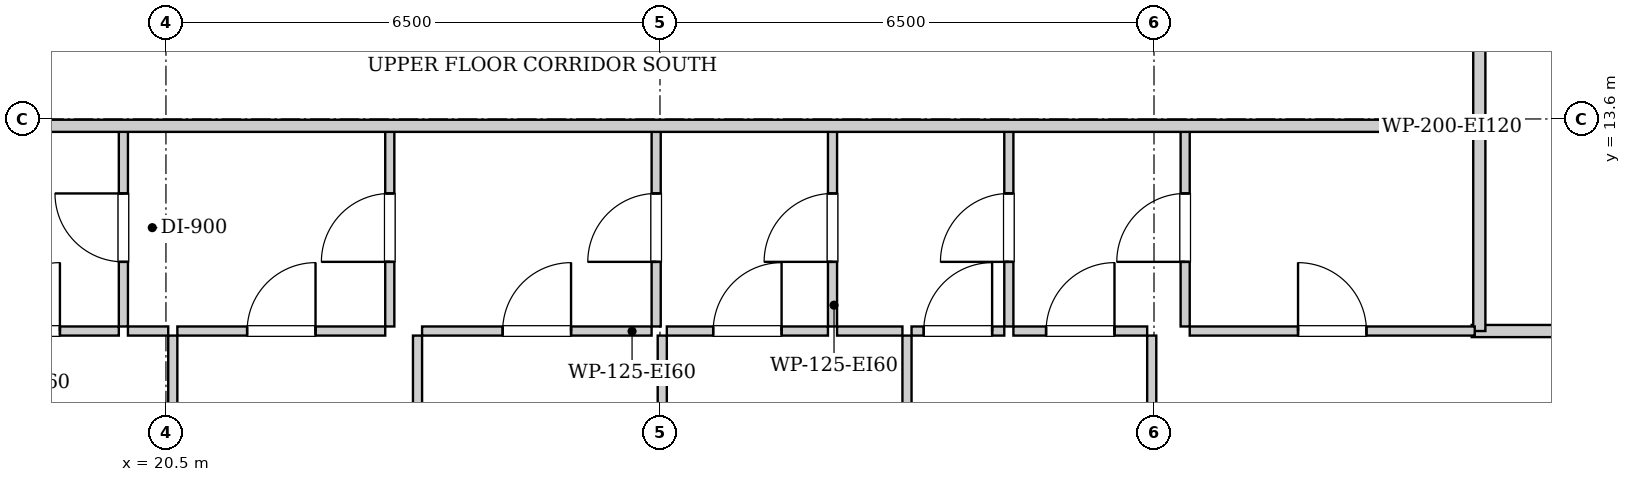
"""IFC4 building model, lengths in metres.
Left out: names, types, materials, properties, quantities, classifications, styles, units other than length and angle.
Written with IfcOpenShell. Run it as: python <this file> out.ifc"""

import sys

from ifc_helpers import new_model, si_unit, direction, frame, frame_2d, origin, place, context, subcontext, project, spatial, rectangle, extrude, element, fill, save


model = new_model("IFC4")
c1 = context("Model", 3, precision=1e-05, world=origin(), true_north=direction((0.0, 1.0)))
c2 = subcontext(c1, "Body", "Model", "MODEL_VIEW")
j1 = project(units=[si_unit("LENGTHUNIT", "METRE"), si_unit("PLANEANGLEUNIT", "RADIAN")], contexts=[c1])
p1 = place(None, origin())
s1 = spatial("IfcSite", under=j1, at=p1, CompositionType="ELEMENT")
p2 = place(p1, origin())
s2 = spatial("IfcBuilding", under=s1, at=p2, CompositionType="ELEMENT")
p3 = place(p2, frame((0.0, 0.0, 181.0)))
s3 = spatial("IfcBuildingStorey", under=s2, at=p3, CompositionType="ELEMENT", Elevation=181.0)
p4 = place(p3, frame((37.78, 13.51, 0.0), z_axis=(0.0, 0.0, 1.0), x_axis=(0.0, 1.0, 0.0)))
e1 = element("IfcWall", 1, at=p4, inside=s3, PredefinedType="PARTITIONING", context=c2, shape_type="SweptSolid", body=[
    extrude(rectangle(XDim=1.58, YDim=0.16, at=frame_2d((0.79, 0.0))), origin(), (0.0, 0.0, 1.0), 3.04),
])
p5 = place(p3, frame((37.68, 10.81, 0.0), z_axis=(0.0, 0.0, 1.0), x_axis=(1.0, 0.0, 0.0)))
e2 = element("IfcWall", 2, at=p5, inside=s3, PredefinedType="PARTITIONING", context=c2, shape_type="SweptSolid", body=[
    extrude(rectangle(XDim=2.34, YDim=0.16, at=frame_2d((1.17, 0.0))), origin(), (0.0, 0.0, 1.0), 3.04),
])
p6 = place(p3, frame((37.78, 10.81, 0.0), z_axis=(0.0, 0.0, 1.0), x_axis=(0.0, 1.0, 0.0)))
e3 = element("IfcWall", 3, at=p6, inside=s3, PredefinedType="PARTITIONING", context=c2, shape_type="SweptSolid", body=[
    extrude(rectangle(XDim=2.66, YDim=0.16, at=frame_2d((1.33, 0.0))), origin(), (0.0, 0.0, 1.0), 3.04),
])
p7 = place(p3, frame((19.94, 10.87, 0.0), z_axis=(0.0, 0.0, 1.0), x_axis=(0.0, 1.0, 0.0)))
e4 = element("IfcWall", 4, at=p7, inside=s3, PredefinedType="PARTITIONING", context=c2, shape_type="SweptSolid", body=[
    extrude(rectangle(XDim=2.6, YDim=0.12, at=frame_2d((1.3, 0.0))), origin(), (0.0, 0.0, 1.0), 3.04),
])
p8 = place(p7, frame((0.85, 0.0, 0.0)))
e5 = element("IfcOpeningElement", 5, at=p8, cuts=e4, PredefinedType="OPENING", context=c2, shape_type="SweptSolid", body=[
    extrude(rectangle(XDim=0.9, YDim=2.05, at=frame_2d((0.45, 1.025))), frame((0.0, 0.07, 0.0), z_axis=(0.0, -1.0, 0.0), x_axis=(1.0, 0.0, 0.0)), (0.0, 0.0, 1.0), 0.14),
])
p9 = place(p3, frame((17.43, 10.81, 0.0), z_axis=(0.0, 0.0, 1.0), x_axis=(1.0, 0.0, 0.0)))
e6 = element("IfcWall", 6, at=p9, inside=s3, PredefinedType="PARTITIONING", context=c2, shape_type="SweptSolid", body=[
    extrude(rectangle(XDim=2.45, YDim=0.12, at=frame_2d((1.225, 0.0))), origin(), (0.0, 0.0, 1.0), 3.04),
])
p10 = place(p9, frame((0.775, 0.0, 0.0)))
e7 = element("IfcOpeningElement", 7, at=p10, cuts=e6, PredefinedType="OPENING", context=c2, shape_type="SweptSolid", body=[
    extrude(rectangle(XDim=0.9, YDim=2.05, at=frame_2d((0.45, 1.025))), frame((0.0, 0.07, 0.0), z_axis=(0.0, -1.0, 0.0), x_axis=(1.0, 0.0, 0.0)), (0.0, 0.0, 1.0), 0.14),
])
p11 = place(p3, frame((23.445, 10.87, 0.0), z_axis=(0.0, 0.0, 1.0), x_axis=(0.0, 1.0, 0.0)))
e8 = element("IfcWall", 8, at=p11, inside=s3, PredefinedType="PARTITIONING", context=c2, shape_type="SweptSolid", body=[
    extrude(rectangle(XDim=2.6, YDim=0.12, at=frame_2d((1.3, 0.0))), origin(), (0.0, 0.0, 1.0), 3.04),
])
p12 = place(p11, frame((0.85, 0.0, 0.0)))
e9 = element("IfcOpeningElement", 9, at=p12, cuts=e8, PredefinedType="OPENING", context=c2, shape_type="SweptSolid", body=[
    extrude(rectangle(XDim=0.9, YDim=2.05, at=frame_2d((0.45, 1.025))), frame((0.0, 0.07, 0.0), z_axis=(0.0, -1.0, 0.0), x_axis=(1.0, 0.0, 0.0)), (0.0, 0.0, 1.0), 0.14),
])
p13 = place(p3, frame((20.0, 10.81, 0.0), z_axis=(0.0, 0.0, 1.0), x_axis=(1.0, 0.0, 0.0)))
e10 = element("IfcWall", 10, at=p13, inside=s3, PredefinedType="PARTITIONING", context=c2, shape_type="SweptSolid", body=[
    extrude(rectangle(XDim=0.53, YDim=0.12, at=frame_2d((0.265, 0.0))), origin(), (0.0, 0.0, 1.0), 3.04),
])
p14 = place(p3, frame((20.65, 10.81, 0.0), z_axis=(0.0, 0.0, 1.0), x_axis=(1.0, 0.0, 0.0)))
e11 = element("IfcWall", 11, at=p14, inside=s3, PredefinedType="PARTITIONING", context=c2, shape_type="SweptSolid", body=[
    extrude(rectangle(XDim=2.735, YDim=0.12, at=frame_2d((1.368, 0.0))), origin(), (0.0, 0.0, 1.0), 3.04),
])
p15 = place(p14, frame((0.918, 0.0, 0.0)))
e12 = element("IfcOpeningElement", 12, at=p15, cuts=e11, PredefinedType="OPENING", context=c2, shape_type="SweptSolid", body=[
    extrude(rectangle(XDim=0.9, YDim=2.05, at=frame_2d((0.45, 1.025))), frame((0.0, 0.07, 0.0), z_axis=(0.0, -1.0, 0.0), x_axis=(1.0, 0.0, 0.0)), (0.0, 0.0, 1.0), 0.14),
])
p16 = place(p3, frame((26.95, 10.87, 0.0), z_axis=(0.0, 0.0, 1.0), x_axis=(0.0, 1.0, 0.0)))
e13 = element("IfcWall", 13, at=p16, inside=s3, PredefinedType="PARTITIONING", context=c2, shape_type="SweptSolid", body=[
    extrude(rectangle(XDim=2.6, YDim=0.12, at=frame_2d((1.3, 0.0))), origin(), (0.0, 0.0, 1.0), 3.04),
])
p17 = place(p16, frame((0.85, 0.0, 0.0)))
e14 = element("IfcOpeningElement", 14, at=p17, cuts=e13, PredefinedType="OPENING", context=c2, shape_type="SweptSolid", body=[
    extrude(rectangle(XDim=0.9, YDim=2.05, at=frame_2d((0.45, 1.025))), frame((0.0, 0.07, 0.0), z_axis=(0.0, -1.0, 0.0), x_axis=(1.0, 0.0, 0.0)), (0.0, 0.0, 1.0), 0.14),
])
p18 = place(p3, frame((23.87, 10.81, 0.0), z_axis=(0.0, 0.0, 1.0), x_axis=(1.0, 0.0, 0.0)))
e15 = element("IfcWall", 15, at=p18, inside=s3, PredefinedType="PARTITIONING", context=c2, shape_type="SweptSolid", body=[
    extrude(rectangle(XDim=3.02, YDim=0.12, at=frame_2d((1.51, 0.0))), origin(), (0.0, 0.0, 1.0), 3.04),
])
p19 = place(p18, frame((1.06, 0.0, 0.0)))
e16 = element("IfcOpeningElement", 16, at=p19, cuts=e15, PredefinedType="OPENING", context=c2, shape_type="SweptSolid", body=[
    extrude(rectangle(XDim=0.9, YDim=2.05, at=frame_2d((0.45, 1.025))), frame((0.0, 0.07, 0.0), z_axis=(0.0, -1.0, 0.0), x_axis=(1.0, 0.0, 0.0)), (0.0, 0.0, 1.0), 0.14),
])
p20 = place(p3, frame((29.27, 10.87, 0.0), z_axis=(0.0, 0.0, 1.0), x_axis=(0.0, 1.0, 0.0)))
e17 = element("IfcWall", 17, at=p20, inside=s3, PredefinedType="PARTITIONING", context=c2, shape_type="SweptSolid", body=[
    extrude(rectangle(XDim=2.6, YDim=0.12, at=frame_2d((1.3, 0.0))), origin(), (0.0, 0.0, 1.0), 3.04),
])
p21 = place(p20, frame((0.85, 0.0, 0.0)))
e18 = element("IfcOpeningElement", 18, at=p21, cuts=e17, PredefinedType="OPENING", context=c2, shape_type="SweptSolid", body=[
    extrude(rectangle(XDim=0.9, YDim=2.05, at=frame_2d((0.45, 1.025))), frame((0.0, 0.07, 0.0), z_axis=(0.0, -1.0, 0.0), x_axis=(1.0, 0.0, 0.0)), (0.0, 0.0, 1.0), 0.14),
])
p22 = place(p3, frame((27.09, 10.81, 0.0), z_axis=(0.0, 0.0, 1.0), x_axis=(1.0, 0.0, 0.0)))
e19 = element("IfcWall", 19, at=p22, inside=s3, PredefinedType="PARTITIONING", context=c2, shape_type="SweptSolid", body=[
    extrude(rectangle(XDim=2.12, YDim=0.12, at=frame_2d((1.06, 0.0))), origin(), (0.0, 0.0, 1.0), 3.04),
])
p23 = place(p22, frame((0.61, 0.0, 0.0)))
e20 = element("IfcOpeningElement", 20, at=p23, cuts=e19, PredefinedType="OPENING", context=c2, shape_type="SweptSolid", body=[
    extrude(rectangle(XDim=0.9, YDim=2.05, at=frame_2d((0.45, 1.025))), frame((0.0, 0.07, 0.0), z_axis=(0.0, -1.0, 0.0), x_axis=(1.0, 0.0, 0.0)), (0.0, 0.0, 1.0), 0.14),
])
p24 = place(p3, frame((31.59, 10.87, 0.0), z_axis=(0.0, 0.0, 1.0), x_axis=(0.0, 1.0, 0.0)))
e21 = element("IfcWall", 21, at=p24, inside=s3, PredefinedType="PARTITIONING", context=c2, shape_type="SweptSolid", body=[
    extrude(rectangle(XDim=2.6, YDim=0.12, at=frame_2d((1.3, 0.0))), origin(), (0.0, 0.0, 1.0), 3.04),
])
p25 = place(p24, frame((0.85, 0.0, 0.0)))
e22 = element("IfcOpeningElement", 22, at=p25, cuts=e21, PredefinedType="OPENING", context=c2, shape_type="SweptSolid", body=[
    extrude(rectangle(XDim=0.9, YDim=2.05, at=frame_2d((0.45, 1.025))), frame((0.0, 0.07, 0.0), z_axis=(0.0, -1.0, 0.0), x_axis=(1.0, 0.0, 0.0)), (0.0, 0.0, 1.0), 0.14),
])
p26 = place(p3, frame((29.33, 10.81, 0.0), z_axis=(0.0, 0.0, 1.0), x_axis=(1.0, 0.0, 0.0)))
e23 = element("IfcWall", 23, at=p26, inside=s3, PredefinedType="PARTITIONING", context=c2, shape_type="SweptSolid", body=[
    extrude(rectangle(XDim=0.86, YDim=0.12, at=frame_2d((0.43, 0.0))), origin(), (0.0, 0.0, 1.0), 3.04),
])
p27 = place(p3, frame((30.31, 10.81, 0.0), z_axis=(0.0, 0.0, 1.0), x_axis=(1.0, 0.0, 0.0)))
e24 = element("IfcWall", 24, at=p27, inside=s3, PredefinedType="PARTITIONING", context=c2, shape_type="SweptSolid", body=[
    extrude(rectangle(XDim=1.22, YDim=0.12, at=frame_2d((0.61, 0.0))), origin(), (0.0, 0.0, 1.0), 3.04),
])
p28 = place(p27, frame((0.16, 0.0, 0.0)))
e25 = element("IfcOpeningElement", 25, at=p28, cuts=e24, PredefinedType="OPENING", context=c2, shape_type="SweptSolid", body=[
    extrude(rectangle(XDim=0.9, YDim=2.05, at=frame_2d((0.45, 1.025))), frame((0.0, 0.07, 0.0), z_axis=(0.0, -1.0, 0.0), x_axis=(1.0, 0.0, 0.0)), (0.0, 0.0, 1.0), 0.14),
])
p29 = place(p3, frame((33.91, 10.87, 0.0), z_axis=(0.0, 0.0, 1.0), x_axis=(0.0, 1.0, 0.0)))
e26 = element("IfcWall", 26, at=p29, inside=s3, PredefinedType="PARTITIONING", context=c2, shape_type="SweptSolid", body=[
    extrude(rectangle(XDim=2.6, YDim=0.12, at=frame_2d((1.3, 0.0))), origin(), (0.0, 0.0, 1.0), 3.04),
])
p30 = place(p29, frame((0.85, 0.0, 0.0)))
e27 = element("IfcOpeningElement", 27, at=p30, cuts=e26, PredefinedType="OPENING", context=c2, shape_type="SweptSolid", body=[
    extrude(rectangle(XDim=0.9, YDim=2.05, at=frame_2d((0.45, 1.025))), frame((0.0, 0.07, 0.0), z_axis=(0.0, -1.0, 0.0), x_axis=(1.0, 0.0, 0.0)), (0.0, 0.0, 1.0), 0.14),
])
p31 = place(p3, frame((31.65, 10.81, 0.0), z_axis=(0.0, 0.0, 1.0), x_axis=(1.0, 0.0, 0.0)))
e28 = element("IfcWall", 28, at=p31, inside=s3, PredefinedType="PARTITIONING", context=c2, shape_type="SweptSolid", body=[
    extrude(rectangle(XDim=1.76, YDim=0.12, at=frame_2d((0.88, 0.0))), origin(), (0.0, 0.0, 1.0), 3.04),
])
p32 = place(p31, frame((0.43, 0.0, 0.0)))
e29 = element("IfcOpeningElement", 29, at=p32, cuts=e28, PredefinedType="OPENING", context=c2, shape_type="SweptSolid", body=[
    extrude(rectangle(XDim=0.9, YDim=2.05, at=frame_2d((0.45, 1.025))), frame((0.0, 0.07, 0.0), z_axis=(0.0, -1.0, 0.0), x_axis=(1.0, 0.0, 0.0)), (0.0, 0.0, 1.0), 0.14),
])
p33 = place(p3, frame((33.97, 10.81, 0.0), z_axis=(0.0, 0.0, 1.0), x_axis=(1.0, 0.0, 0.0)))
e30 = element("IfcWall", 30, at=p33, inside=s3, PredefinedType="PARTITIONING", context=c2, shape_type="SweptSolid", body=[
    extrude(rectangle(XDim=3.75, YDim=0.12, at=frame_2d((1.875, 0.0))), origin(), (0.0, 0.0, 1.0), 3.04),
])
p34 = place(p33, frame((1.425, 0.0, 0.0)))
e31 = element("IfcOpeningElement", 31, at=p34, cuts=e30, PredefinedType="OPENING", context=c2, shape_type="SweptSolid", body=[
    extrude(rectangle(XDim=0.9, YDim=2.05, at=frame_2d((0.45, 1.025))), frame((0.0, 0.07, 0.0), z_axis=(0.0, -1.0, 0.0), x_axis=(1.0, 0.0, 0.0)), (0.0, 0.0, 1.0), 0.14),
])
p35 = place(p3, frame((20.59, 4.08, 0.0), z_axis=(0.0, 0.0, 1.0), x_axis=(0.0, 1.0, 0.0)))
e32 = element("IfcWall", 32, at=p35, inside=s3, PredefinedType="PARTITIONING", context=c2, shape_type="SweptSolid", body=[
    extrude(rectangle(XDim=6.67, YDim=0.12, at=frame_2d((3.335, 0.0))), origin(), (0.0, 0.0, 1.0), 3.04),
])
p36 = place(p35, frame((2.87, 0.0, 0.0)))
e33 = element("IfcOpeningElement", 33, at=p36, cuts=e32, PredefinedType="OPENING", context=c2, shape_type="SweptSolid", body=[
    extrude(rectangle(XDim=0.9, YDim=2.05, at=frame_2d((0.45, 1.025))), frame((0.0, 0.07, 0.0), z_axis=(0.0, -1.0, 0.0), x_axis=(1.0, 0.0, 0.0)), (0.0, 0.0, 1.0), 0.14),
])
p37 = place(p3, frame((23.81, 4.08, 0.0), z_axis=(0.0, 0.0, 1.0), x_axis=(0.0, 1.0, 0.0)))
e34 = element("IfcWall", 34, at=p37, inside=s3, PredefinedType="PARTITIONING", context=c2, shape_type="SweptSolid", body=[
    extrude(rectangle(XDim=6.67, YDim=0.12, at=frame_2d((3.335, 0.0))), origin(), (0.0, 0.0, 1.0), 3.04),
])
p38 = place(p37, frame((2.87, 0.0, 0.0)))
e35 = element("IfcOpeningElement", 35, at=p38, cuts=e34, PredefinedType="OPENING", context=c2, shape_type="SweptSolid", body=[
    extrude(rectangle(XDim=0.9, YDim=2.05, at=frame_2d((0.45, 1.025))), frame((0.0, 0.07, 0.0), z_axis=(0.0, -1.0, 0.0), x_axis=(1.0, 0.0, 0.0)), (0.0, 0.0, 1.0), 0.14),
])
p39 = place(p3, frame((27.03, 4.08, 0.0), z_axis=(0.0, 0.0, 1.0), x_axis=(0.0, 1.0, 0.0)))
e36 = element("IfcWall", 36, at=p39, inside=s3, PredefinedType="PARTITIONING", context=c2, shape_type="SweptSolid", body=[
    extrude(rectangle(XDim=6.67, YDim=0.12, at=frame_2d((3.335, 0.0))), origin(), (0.0, 0.0, 1.0), 3.04),
])
p40 = place(p39, frame((2.87, 0.0, 0.0)))
e37 = element("IfcOpeningElement", 37, at=p40, cuts=e36, PredefinedType="OPENING", context=c2, shape_type="SweptSolid", body=[
    extrude(rectangle(XDim=0.9, YDim=2.05, at=frame_2d((0.45, 1.025))), frame((0.0, 0.07, 0.0), z_axis=(0.0, -1.0, 0.0), x_axis=(1.0, 0.0, 0.0)), (0.0, 0.0, 1.0), 0.14),
])
p41 = place(p3, frame((30.25, 4.08, 0.0), z_axis=(0.0, 0.0, 1.0), x_axis=(0.0, 1.0, 0.0)))
e38 = element("IfcWall", 38, at=p41, inside=s3, PredefinedType="PARTITIONING", context=c2, shape_type="SweptSolid", body=[
    extrude(rectangle(XDim=6.67, YDim=0.12, at=frame_2d((3.335, 0.0))), origin(), (0.0, 0.0, 1.0), 3.04),
])
p42 = place(p41, frame((2.87, 0.0, 0.0)))
e39 = element("IfcOpeningElement", 39, at=p42, cuts=e38, PredefinedType="OPENING", context=c2, shape_type="SweptSolid", body=[
    extrude(rectangle(XDim=0.9, YDim=2.05, at=frame_2d((0.45, 1.025))), frame((0.0, 0.07, 0.0), z_axis=(0.0, -1.0, 0.0), x_axis=(1.0, 0.0, 0.0)), (0.0, 0.0, 1.0), 0.14),
])
p43 = place(p3, frame((33.47, 6.23, 0.0), z_axis=(0.0, 0.0, 1.0), x_axis=(0.0, 1.0, 0.0)))
e40 = element("IfcWall", 40, at=p43, inside=s3, PredefinedType="PARTITIONING", context=c2, shape_type="SweptSolid", body=[
    extrude(rectangle(XDim=4.52, YDim=0.12, at=frame_2d((2.26, 0.0))), origin(), (0.0, 0.0, 1.0), 3.04),
])
p44 = place(p43, frame((1.81, 0.0, 0.0)))
e41 = element("IfcOpeningElement", 41, at=p44, cuts=e40, PredefinedType="OPENING", context=c2, shape_type="SweptSolid", body=[
    extrude(rectangle(XDim=0.9, YDim=2.05, at=frame_2d((0.45, 1.025))), frame((0.0, 0.07, 0.0), z_axis=(0.0, -1.0, 0.0), x_axis=(1.0, 0.0, 0.0)), (0.0, 0.0, 1.0), 0.14),
])
p45 = place(p3, frame((13.15, 13.51, 0.0), z_axis=(0.0, 0.0, 1.0), x_axis=(1.0, 0.0, 0.0)))
e42 = element("IfcWall", 42, at=p45, inside=s3, PredefinedType="PARTITIONING", context=c2, shape_type="SweptSolid", body=[
    extrude(rectangle(XDim=24.6, YDim=0.16, at=frame_2d((12.3, 0.0))), origin(), (0.0, 0.0, 1.0), 3.04),
])
p46 = place(p45, frame((3.115, 0.0, 0.0)))
e43 = element("IfcOpeningElement", 43, at=p46, cuts=e42, PredefinedType="OPENING", context=c2, shape_type="SweptSolid", body=[
    extrude(rectangle(XDim=0.95, YDim=2.1, at=frame_2d((0.475, 1.05))), frame((0.0, 0.09, 0.0), z_axis=(0.0, -1.0, 0.0), x_axis=(1.0, 0.0, 0.0)), (0.0, 0.0, 1.0), 0.18),
])
p47 = place(p8, origin())
e44 = element("IfcDoor", 44, at=p47, inside=s3, OperationType="SINGLE_SWING_RIGHT", PredefinedType="DOOR", context=c2, shape_type="SweptSolid", body=[
    extrude(rectangle(XDim=0.9, YDim=2.05, at=frame_2d((0.45, 1.025))), frame((0.0, 0.025, 0.0), z_axis=(0.0, -1.0, 0.0), x_axis=(1.0, 0.0, 0.0)), (0.0, 0.0, 1.0), 0.05),
])
fill(e5, e44)
p48 = place(p10, origin())
e45 = element("IfcDoor", 45, at=p48, inside=s3, OperationType="SINGLE_SWING_RIGHT", PredefinedType="DOOR", context=c2, shape_type="SweptSolid", body=[
    extrude(rectangle(XDim=0.9, YDim=2.05, at=frame_2d((0.45, 1.025))), frame((0.0, 0.025, 0.0), z_axis=(0.0, -1.0, 0.0), x_axis=(1.0, 0.0, 0.0)), (0.0, 0.0, 1.0), 0.05),
])
fill(e7, e45)
p49 = place(p12, origin())
e46 = element("IfcDoor", 46, at=p49, inside=s3, OperationType="SINGLE_SWING_LEFT", PredefinedType="DOOR", context=c2, shape_type="SweptSolid", body=[
    extrude(rectangle(XDim=0.9, YDim=2.05, at=frame_2d((0.45, 1.025))), frame((0.0, 0.025, 0.0), z_axis=(0.0, -1.0, 0.0), x_axis=(1.0, 0.0, 0.0)), (0.0, 0.0, 1.0), 0.05),
])
fill(e9, e46)
p50 = place(p15, origin())
e47 = element("IfcDoor", 47, at=p50, inside=s3, OperationType="SINGLE_SWING_RIGHT", PredefinedType="DOOR", context=c2, shape_type="SweptSolid", body=[
    extrude(rectangle(XDim=0.9, YDim=2.05, at=frame_2d((0.45, 1.025))), frame((0.0, 0.025, 0.0), z_axis=(0.0, -1.0, 0.0), x_axis=(1.0, 0.0, 0.0)), (0.0, 0.0, 1.0), 0.05),
])
fill(e12, e47)
p51 = place(p17, origin())
e48 = element("IfcDoor", 48, at=p51, inside=s3, OperationType="SINGLE_SWING_LEFT", PredefinedType="DOOR", context=c2, shape_type="SweptSolid", body=[
    extrude(rectangle(XDim=0.9, YDim=2.05, at=frame_2d((0.45, 1.025))), frame((0.0, 0.025, 0.0), z_axis=(0.0, -1.0, 0.0), x_axis=(1.0, 0.0, 0.0)), (0.0, 0.0, 1.0), 0.05),
])
fill(e14, e48)
p52 = place(p19, origin())
e49 = element("IfcDoor", 49, at=p52, inside=s3, OperationType="SINGLE_SWING_RIGHT", PredefinedType="DOOR", context=c2, shape_type="SweptSolid", body=[
    extrude(rectangle(XDim=0.9, YDim=2.05, at=frame_2d((0.45, 1.025))), frame((0.0, 0.025, 0.0), z_axis=(0.0, -1.0, 0.0), x_axis=(1.0, 0.0, 0.0)), (0.0, 0.0, 1.0), 0.05),
])
fill(e16, e49)
p53 = place(p21, origin())
e50 = element("IfcDoor", 50, at=p53, inside=s3, OperationType="SINGLE_SWING_LEFT", PredefinedType="DOOR", context=c2, shape_type="SweptSolid", body=[
    extrude(rectangle(XDim=0.9, YDim=2.05, at=frame_2d((0.45, 1.025))), frame((0.0, 0.025, 0.0), z_axis=(0.0, -1.0, 0.0), x_axis=(1.0, 0.0, 0.0)), (0.0, 0.0, 1.0), 0.05),
])
fill(e18, e50)
p54 = place(p23, origin())
e51 = element("IfcDoor", 51, at=p54, inside=s3, OperationType="SINGLE_SWING_RIGHT", PredefinedType="DOOR", context=c2, shape_type="SweptSolid", body=[
    extrude(rectangle(XDim=0.9, YDim=2.05, at=frame_2d((0.45, 1.025))), frame((0.0, 0.025, 0.0), z_axis=(0.0, -1.0, 0.0), x_axis=(1.0, 0.0, 0.0)), (0.0, 0.0, 1.0), 0.05),
])
fill(e20, e51)
p55 = place(p25, origin())
e52 = element("IfcDoor", 52, at=p55, inside=s3, OperationType="SINGLE_SWING_LEFT", PredefinedType="DOOR", context=c2, shape_type="SweptSolid", body=[
    extrude(rectangle(XDim=0.9, YDim=2.05, at=frame_2d((0.45, 1.025))), frame((0.0, 0.025, 0.0), z_axis=(0.0, -1.0, 0.0), x_axis=(1.0, 0.0, 0.0)), (0.0, 0.0, 1.0), 0.05),
])
fill(e22, e52)
p56 = place(p28, origin())
e53 = element("IfcDoor", 53, at=p56, inside=s3, OperationType="SINGLE_SWING_RIGHT", PredefinedType="DOOR", context=c2, shape_type="SweptSolid", body=[
    extrude(rectangle(XDim=0.9, YDim=2.05, at=frame_2d((0.45, 1.025))), frame((0.0, 0.025, 0.0), z_axis=(0.0, -1.0, 0.0), x_axis=(1.0, 0.0, 0.0)), (0.0, 0.0, 1.0), 0.05),
])
fill(e25, e53)
p57 = place(p30, origin())
e54 = element("IfcDoor", 54, at=p57, inside=s3, OperationType="SINGLE_SWING_LEFT", PredefinedType="DOOR", context=c2, shape_type="SweptSolid", body=[
    extrude(rectangle(XDim=0.9, YDim=2.05, at=frame_2d((0.45, 1.025))), frame((0.0, 0.025, 0.0), z_axis=(0.0, -1.0, 0.0), x_axis=(1.0, 0.0, 0.0)), (0.0, 0.0, 1.0), 0.05),
])
fill(e27, e54)
p58 = place(p32, origin())
e55 = element("IfcDoor", 55, at=p58, inside=s3, OperationType="SINGLE_SWING_RIGHT", PredefinedType="DOOR", context=c2, shape_type="SweptSolid", body=[
    extrude(rectangle(XDim=0.9, YDim=2.05, at=frame_2d((0.45, 1.025))), frame((0.0, 0.025, 0.0), z_axis=(0.0, -1.0, 0.0), x_axis=(1.0, 0.0, 0.0)), (0.0, 0.0, 1.0), 0.05),
])
fill(e29, e55)
p59 = place(p34, origin())
e56 = element("IfcDoor", 56, at=p59, inside=s3, OperationType="SINGLE_SWING_LEFT", PredefinedType="DOOR", context=c2, shape_type="SweptSolid", body=[
    extrude(rectangle(XDim=0.9, YDim=2.05, at=frame_2d((0.45, 1.025))), frame((0.0, 0.025, 0.0), z_axis=(0.0, -1.0, 0.0), x_axis=(1.0, 0.0, 0.0)), (0.0, 0.0, 1.0), 0.05),
])
fill(e31, e56)
save(model, sys.argv[1])
